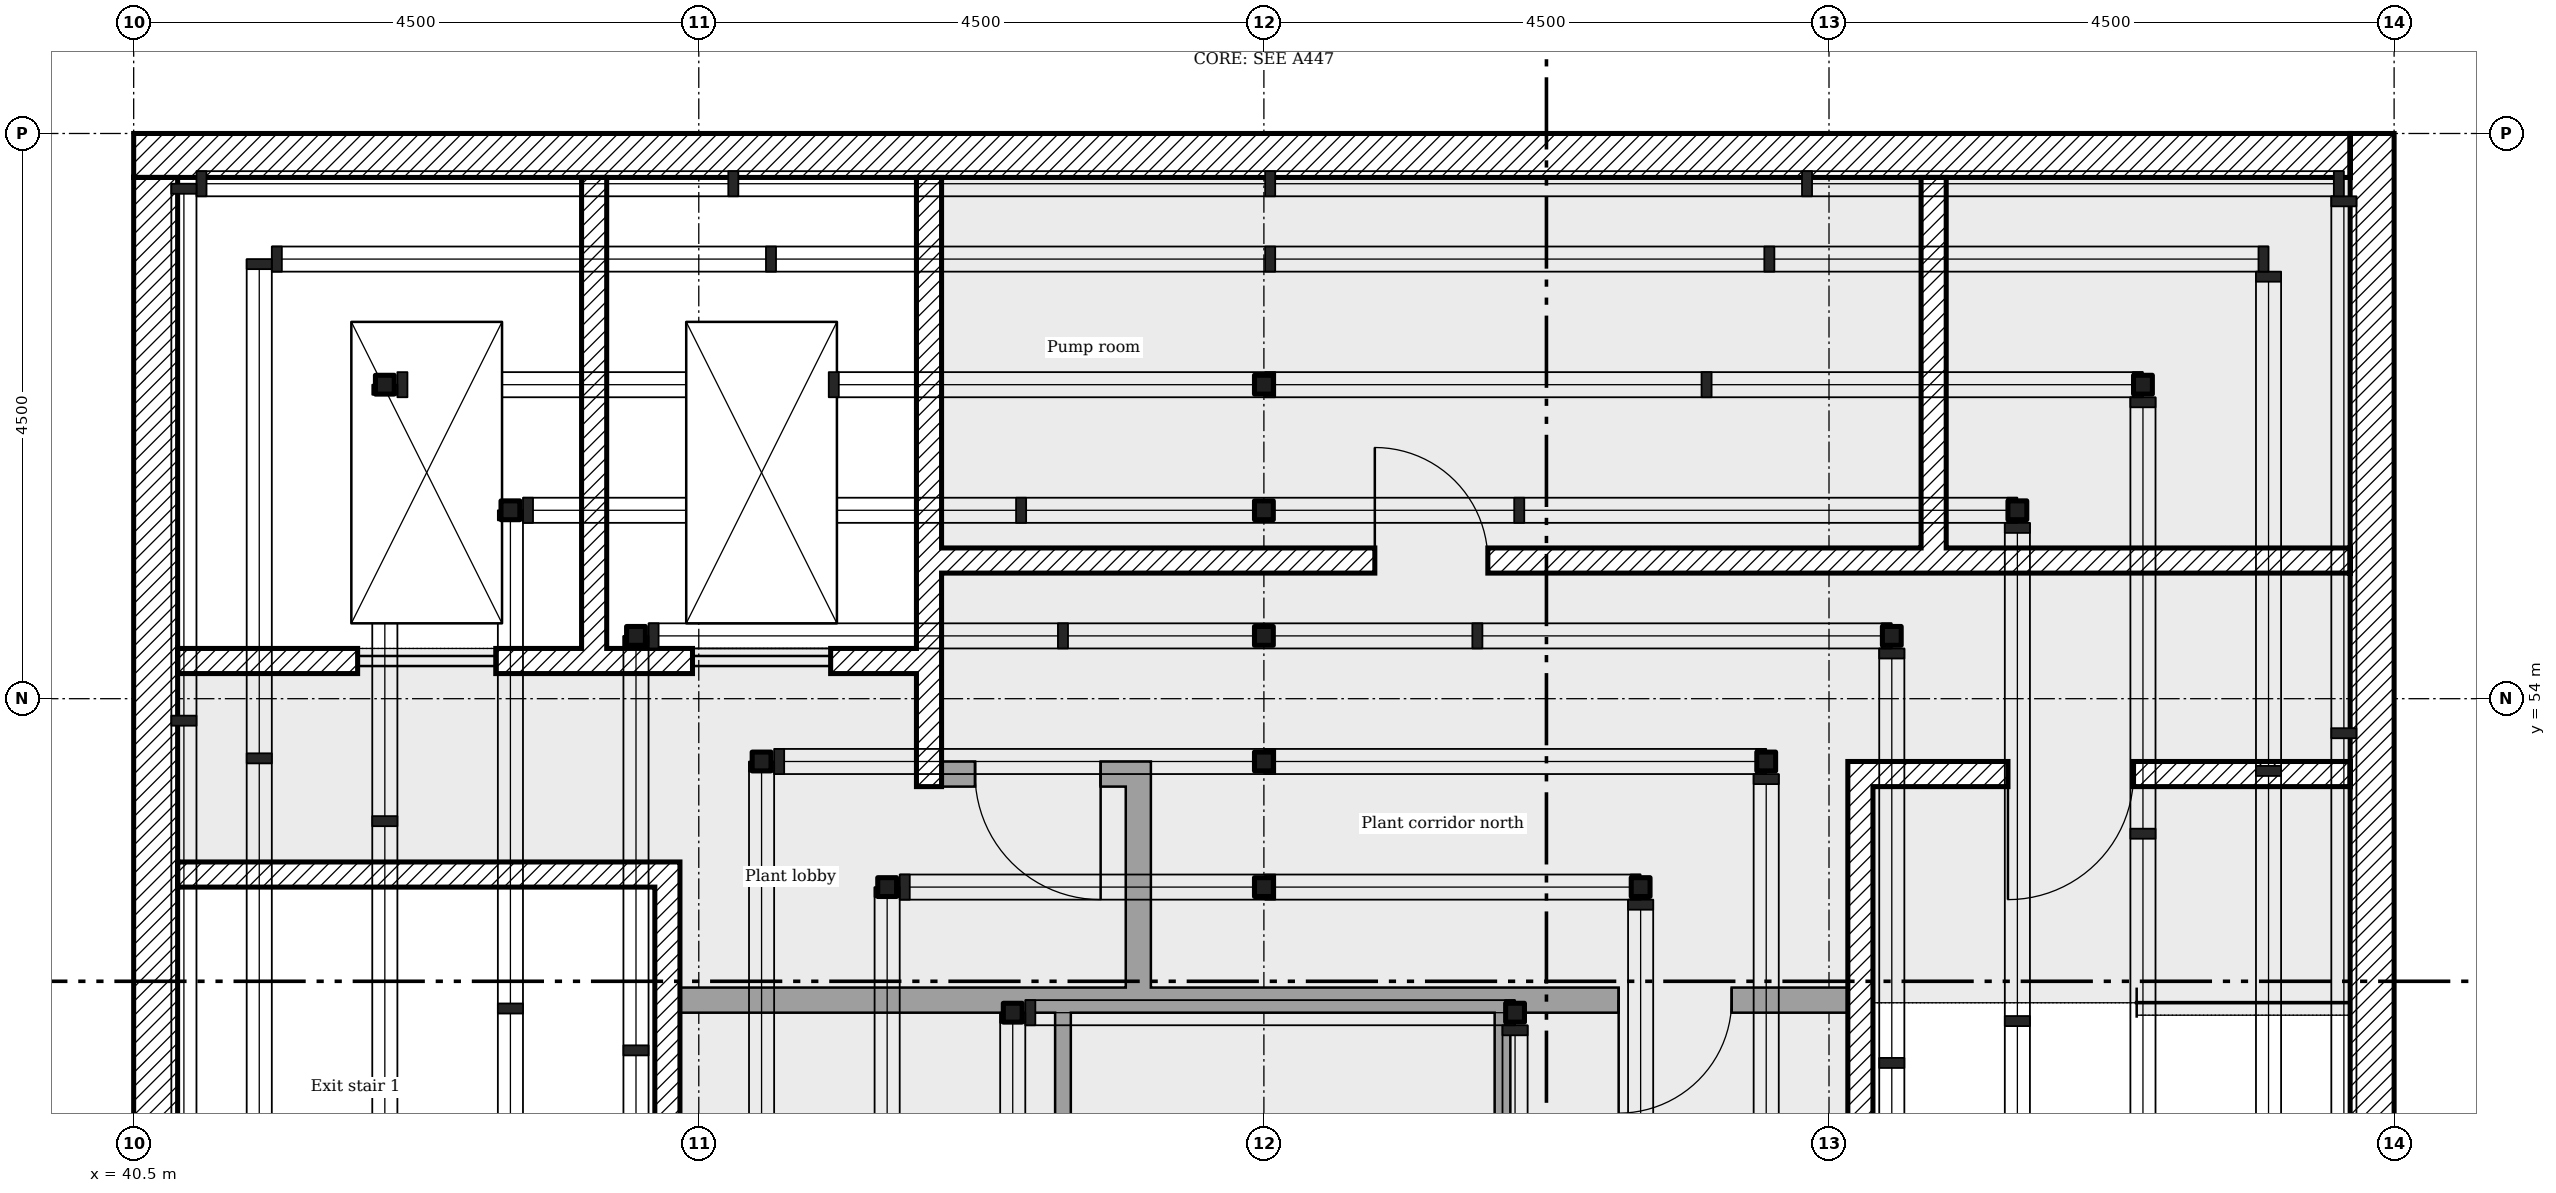
"""IFC4 building model, lengths in metres.
Left out: names, types, materials, properties, quantities, classifications, styles, units other than length and angle.
Written with IfcOpenShell. Run it as: python <this file> out.ifc"""

import sys

from ifc_helpers import new_model, si_unit, direction, frame, frame_2d, origin, origin_2d, place, context, subcontext, project, spatial, rectangle, hollow_rectangle, extrude, element, fill, save


model = new_model("IFC4")
c1 = context("Model", 3, precision=1e-05, world=origin(), true_north=direction((0.0, 1.0)))
c2 = subcontext(c1, "Body", "Model", "MODEL_VIEW")
j1 = project(units=[si_unit("LENGTHUNIT", "METRE"), si_unit("PLANEANGLEUNIT", "RADIAN")], contexts=[c1])
p1 = place(None, origin())
s1 = spatial("IfcSite", under=j1, at=p1, CompositionType="ELEMENT")
p2 = place(p1, origin())
s2 = spatial("IfcBuilding", under=s1, at=p2, CompositionType="ELEMENT")
p3 = place(p2, frame((0.0, 0.0, 279.1)))
s3 = spatial("IfcBuildingStorey", under=s2, at=p3, CompositionType="ELEMENT", Elevation=279.1)
for number, where, z_axis, x_axis in (
    (1, (58.375, 40.75, 4.5), (0.0, 0.0, 1.0), (0.0, 1.0, 0.0)),
    (2, (58.25, 58.375, 4.5), (0.0, 0.0, 1.0), (-1.0, 0.0, 0.0)),
):
    element("IfcWall", number, at=place(p3, frame(where, z_axis=z_axis, x_axis=x_axis)), inside=s3, PredefinedType="PARAPET", context=c2, shape_type="SweptSolid", body=[
        extrude(rectangle(XDim=17.75, YDim=0.25, at=frame_2d((8.875, 0.0))), origin(), (0.0, 0.0, 1.0), 1.1),
    ])
p4 = place(p3, frame((40.625, 58.25, 4.5), z_axis=(0.0, 0.0, 1.0), x_axis=(0.0, -1.0, 0.0)))
e3 = element("IfcWall", 3, at=p4, inside=s3, PredefinedType="PARAPET", context=c2, shape_type="SweptSolid", body=[
    extrude(rectangle(XDim=17.5, YDim=0.25, at=frame_2d((8.75, 0.0))), origin(), (0.0, 0.0, 1.0), 1.1),
])
for number, where in (
    (4, (56.5, 56.5, 4.5)),
    (5, (49.5, 56.5, 4.5)),
    (6, (42.5, 56.5, 4.5)),
):
    element("IfcColumn", number, at=place(p3, frame(where)), inside=s3, PredefinedType="COLUMN", context=c2, shape_type="SweptSolid", body=[
        extrude(hollow_rectangle(XDim=0.15, YDim=0.15, WallThickness=0.008, at=origin_2d()), origin(), (0.0, 0.0, 1.0), 1.8),
    ])
for number, where in (
    (7, (55.5, 55.5, 4.5)),
    (8, (49.5, 55.5, 4.5)),
    (9, (43.5, 55.5, 4.5)),
):
    element("IfcColumn", number, at=place(p3, frame(where)), inside=s3, PredefinedType="COLUMN", context=c2, shape_type="SweptSolid", body=[
        extrude(hollow_rectangle(XDim=0.15, YDim=0.15, WallThickness=0.008, at=origin_2d()), origin(), (0.0, 0.0, 1.0), 3.95),
    ])
for number, where in (
    (10, (54.5, 54.5, 4.5)),
    (11, (49.5, 54.5, 4.5)),
    (12, (44.5, 54.5, 4.5)),
):
    element("IfcColumn", number, at=place(p3, frame(where)), inside=s3, PredefinedType="COLUMN", context=c2, shape_type="SweptSolid", body=[
        extrude(hollow_rectangle(XDim=0.15, YDim=0.15, WallThickness=0.008, at=origin_2d()), origin(), (0.0, 0.0, 1.0), 6.1),
    ])
for number, where in (
    (13, (53.5, 53.5, 4.5)),
    (14, (49.5, 53.5, 4.5)),
    (15, (45.5, 53.5, 4.5)),
):
    element("IfcColumn", number, at=place(p3, frame(where)), inside=s3, PredefinedType="COLUMN", context=c2, shape_type="SweptSolid", body=[
        extrude(hollow_rectangle(XDim=0.15, YDim=0.15, WallThickness=0.008, at=origin_2d()), origin(), (0.0, 0.0, 1.0), 8.29),
    ])
for number, where in (
    (16, (52.5, 52.5, 4.5)),
    (17, (49.5, 52.5, 4.5)),
    (18, (46.5, 52.5, 4.5)),
):
    element("IfcColumn", number, at=place(p3, frame(where)), inside=s3, PredefinedType="COLUMN", context=c2, shape_type="SweptSolid", body=[
        extrude(hollow_rectangle(XDim=0.15, YDim=0.15, WallThickness=0.008, at=origin_2d()), origin(), (0.0, 0.0, 1.0), 10.48),
    ])
for number, where in (
    (19, (51.5, 51.5, 4.5)),
    (20, (47.5, 51.5, 4.5)),
):
    element("IfcColumn", number, at=place(p3, frame(where)), inside=s3, PredefinedType="COLUMN", context=c2, shape_type="SweptSolid", body=[
        extrude(hollow_rectangle(XDim=0.15, YDim=0.15, WallThickness=0.008, at=origin_2d()), origin(), (0.0, 0.0, 1.0), 12.59),
    ])
p5 = place(p3, frame((58.325, 40.5, 0.0), z_axis=(0.0, 0.0, 1.0), x_axis=(0.0, 1.0, 0.0)))
e21 = element("IfcWall", 21, at=p5, inside=s3, PredefinedType="SHEAR", context=c2, shape_type="SweptSolid", body=[
    extrude(rectangle(XDim=18.0, YDim=0.35, at=frame_2d((9.0, 0.0))), origin(), (0.0, 0.0, 1.0), 3.3),
])
p6 = place(p3, frame((40.5, 58.325, 0.0)))
e22 = element("IfcWall", 22, at=p6, inside=s3, PredefinedType="SHEAR", context=c2, shape_type="SweptSolid", body=[
    extrude(rectangle(XDim=17.65, YDim=0.35, at=frame_2d((8.825, 0.0))), origin(), (0.0, 0.0, 1.0), 3.3),
])
p7 = place(p3, frame((40.675, 40.85, 0.0), z_axis=(0.0, 0.0, 1.0), x_axis=(0.0, 1.0, 0.0)))
e23 = element("IfcWall", 23, at=p7, inside=s3, PredefinedType="SHEAR", context=c2, shape_type="SweptSolid", body=[
    extrude(rectangle(XDim=17.3, YDim=0.35, at=frame_2d((8.65, 0.0))), origin(), (0.0, 0.0, 1.0), 3.3),
])
p8 = place(p3, frame((44.167, 58.15, 0.0), z_axis=(0.0, 0.0, 1.0), x_axis=(0.0, -1.0, 0.0)))
e24 = element("IfcWall", 24, at=p8, inside=s3, PredefinedType="SHEAR", context=c2, shape_type="SweptSolid", body=[
    extrude(rectangle(XDim=3.75, YDim=0.2, at=frame_2d((1.875, 0.0))), origin(), (0.0, 0.0, 1.0), 3.3),
])
p9 = place(p3, frame((46.833, 58.15, 0.0), z_axis=(0.0, 0.0, 1.0), x_axis=(0.0, -1.0, 0.0)))
e25 = element("IfcWall", 25, at=p9, inside=s3, PredefinedType="SHEAR", context=c2, shape_type="SweptSolid", body=[
    extrude(rectangle(XDim=4.85, YDim=0.2, at=frame_2d((2.425, 0.0))), origin(), (0.0, 0.0, 1.0), 3.3),
])
p10 = place(p3, frame((54.833, 58.15, 0.0), z_axis=(0.0, 0.0, 1.0), x_axis=(0.0, -1.0, 0.0)))
e26 = element("IfcWall", 26, at=p10, inside=s3, PredefinedType="SHEAR", context=c2, shape_type="SweptSolid", body=[
    extrude(rectangle(XDim=2.95, YDim=0.2, at=frame_2d((1.475, 0.0))), origin(), (0.0, 0.0, 1.0), 3.3),
])
p11 = place(p3, frame((48.5, 51.6, 0.0), z_axis=(0.0, 0.0, 1.0), x_axis=(0.0, 1.0, 0.0)))
e27 = element("IfcWall", 27, at=p11, inside=s3, PredefinedType="PARTITIONING", context=c2, shape_type="SweptSolid", body=[
    extrude(rectangle(XDim=1.9, YDim=0.2, at=frame_2d((0.95, 0.0))), origin(), (0.0, 0.0, 1.0), 3.3),
])
p12 = place(p3, frame((46.933, 53.4, 0.0)))
e28 = element("IfcWall", 28, at=p12, inside=s3, PredefinedType="PARTITIONING", context=c2, shape_type="SweptSolid", body=[
    extrude(rectangle(XDim=1.467, YDim=0.2, at=frame_2d((0.733, 0.0))), origin(), (0.0, 0.0, 1.0), 3.3),
])
p13 = place(p12, frame((0.267, 0.0, 0.0)))
e29 = element("IfcOpeningElement", 29, at=p13, cuts=e28, PredefinedType="OPENING", context=c2, shape_type="SweptSolid", body=[
    extrude(rectangle(XDim=1.0, YDim=2.1, at=frame_2d((0.5, 1.05))), frame((0.0, 0.11, 0.0), z_axis=(0.0, -1.0, 0.0), x_axis=(1.0, 0.0, 0.0)), (0.0, 0.0, 1.0), 0.22),
])
p14 = place(p3, frame((46.933, 55.1, 0.0)))
e30 = element("IfcWall", 30, at=p14, inside=s3, PredefinedType="SHEAR", context=c2, shape_type="SweptSolid", body=[
    extrude(rectangle(XDim=11.217, YDim=0.2, at=frame_2d((5.608, 0.0))), origin(), (0.0, 0.0, 1.0), 3.3),
])
p15 = place(p14, frame((3.45, 0.0, 0.0)))
e31 = element("IfcOpeningElement", 31, at=p15, cuts=e30, PredefinedType="OPENING", context=c2, shape_type="SweptSolid", body=[
    extrude(rectangle(XDim=0.9, YDim=2.1, at=frame_2d((0.45, 1.05))), frame((0.0, 0.11, 0.0), z_axis=(0.0, -1.0, 0.0), x_axis=(1.0, 0.0, 0.0)), (0.0, 0.0, 1.0), 0.22),
])
p16 = place(p3, frame((40.85, 54.3, 0.0)))
e32 = element("IfcWall", 32, at=p16, inside=s3, PredefinedType="SHEAR", context=c2, shape_type="SweptSolid", body=[
    extrude(rectangle(XDim=5.883, YDim=0.2, at=frame_2d((2.942, 0.0))), origin(), (0.0, 0.0, 1.0), 3.3),
])
p17 = place(p16, frame((1.433, 0.0, 0.0)))
e33 = element("IfcOpeningElement", 33, at=p17, cuts=e32, PredefinedType="OPENING", context=c2, shape_type="SweptSolid", body=[
    extrude(rectangle(XDim=1.1, YDim=2.1, at=frame_2d((0.55, 1.05))), frame((0.0, 0.11, 0.0), z_axis=(0.0, -1.0, 0.0), x_axis=(1.0, 0.0, 0.0)), (0.0, 0.0, 1.0), 0.22),
])
p18 = place(p16, frame((4.1, 0.0, 0.0)))
e34 = element("IfcOpeningElement", 34, at=p18, cuts=e32, PredefinedType="OPENING", context=c2, shape_type="SweptSolid", body=[
    extrude(rectangle(XDim=1.1, YDim=2.1, at=frame_2d((0.55, 1.05))), frame((0.0, 0.11, 0.0), z_axis=(0.0, -1.0, 0.0), x_axis=(1.0, 0.0, 0.0)), (0.0, 0.0, 1.0), 0.22),
])
p19 = place(p3, frame((44.75, 45.5, 0.0), z_axis=(0.0, 0.0, 1.0), x_axis=(0.0, 1.0, 0.0)))
e35 = element("IfcWall", 35, at=p19, inside=s3, PredefinedType="SHEAR", context=c2, shape_type="SweptSolid", body=[
    extrude(rectangle(XDim=7.2, YDim=0.2, at=frame_2d((3.6, 0.0))), origin(), (0.0, 0.0, 1.0), 3.3),
])
p20 = place(p3, frame((40.85, 52.6, 0.0)))
e36 = element("IfcWall", 36, at=p20, inside=s3, PredefinedType="SHEAR", context=c2, shape_type="SweptSolid", body=[
    extrude(rectangle(XDim=3.8, YDim=0.2, at=frame_2d((1.9, 0.0))), origin(), (0.0, 0.0, 1.0), 3.3),
])
p21 = place(p3, frame((54.15, 53.4, 0.0)))
e37 = element("IfcWall", 37, at=p21, inside=s3, PredefinedType="SHEAR", context=c2, shape_type="SweptSolid", body=[
    extrude(rectangle(XDim=4.0, YDim=0.2, at=frame_2d((2.0, 0.0))), origin(), (0.0, 0.0, 1.0), 3.3),
])
p22 = place(p21, frame((1.275, 0.0, 0.0)))
e38 = element("IfcOpeningElement", 38, at=p22, cuts=e37, PredefinedType="OPENING", context=c2, shape_type="SweptSolid", body=[
    extrude(rectangle(XDim=1.0, YDim=2.1, at=frame_2d((0.5, 1.05))), frame((0.0, 0.11, 0.0), z_axis=(0.0, -1.0, 0.0), x_axis=(1.0, 0.0, 0.0)), (0.0, 0.0, 1.0), 0.22),
])
p23 = place(p3, frame((54.25, 46.5, 0.0), z_axis=(0.0, 0.0, 1.0), x_axis=(0.0, 1.0, 0.0)))
e39 = element("IfcWall", 39, at=p23, inside=s3, PredefinedType="SHEAR", context=c2, shape_type="SweptSolid", body=[
    extrude(rectangle(XDim=6.8, YDim=0.2, at=frame_2d((3.4, 0.0))), origin(), (0.0, 0.0, 1.0), 3.3),
])
p24 = place(p3, frame((44.85, 51.6, 0.0)))
e40 = element("IfcWall", 40, at=p24, inside=s3, PredefinedType="PARTITIONING", context=c2, shape_type="SweptSolid", body=[
    extrude(rectangle(XDim=9.3, YDim=0.2, at=frame_2d((4.65, 0.0))), origin(), (0.0, 0.0, 1.0), 3.3),
])
p25 = place(p24, frame((7.475, 0.0, 0.0)))
e41 = element("IfcOpeningElement", 41, at=p25, cuts=e40, PredefinedType="OPENING", context=c2, shape_type="SweptSolid", body=[
    extrude(rectangle(XDim=0.9, YDim=2.1, at=frame_2d((0.45, 1.05))), frame((0.0, 0.11, 0.0), z_axis=(0.0, -1.0, 0.0), x_axis=(1.0, 0.0, 0.0)), (0.0, 0.0, 1.0), 0.22),
])
p26 = place(p3, frame((47.9, 46.8, 0.0), z_axis=(0.0, 0.0, 1.0), x_axis=(0.0, 1.0, 0.0)))
e42 = element("IfcWall", 42, at=p26, inside=s3, PredefinedType="PARTITIONING", context=c2, shape_type="SweptSolid", body=[
    extrude(rectangle(XDim=4.7, YDim=0.125, at=frame_2d((2.35, 0.0))), origin(), (0.0, 0.0, 1.0), 3.3),
])
p27 = place(p3, frame((51.4, 49.5, 0.0), z_axis=(0.0, 0.0, 1.0), x_axis=(0.0, 1.0, 0.0)))
e43 = element("IfcWall", 43, at=p27, inside=s3, PredefinedType="PARTITIONING", context=c2, shape_type="SweptSolid", body=[
    extrude(rectangle(XDim=2.0, YDim=0.125, at=frame_2d((1.0, 0.0))), origin(), (0.0, 0.0, 1.0), 3.3),
])
p28 = place(p22, frame((1.0, 0.0, 0.0), x_axis=(-1.0, 0.0, 0.0)))
e44 = element("IfcDoor", 44, at=p28, inside=s3, OperationType="SINGLE_SWING_LEFT", PredefinedType="DOOR", context=c2, shape_type="SweptSolid", body=[
    extrude(rectangle(XDim=1.0, YDim=2.1, at=frame_2d((0.5, 1.05))), frame((0.0, 0.025, 0.0), z_axis=(0.0, -1.0, 0.0), x_axis=(1.0, 0.0, 0.0)), (0.0, 0.0, 1.0), 0.05),
])
fill(e38, e44)
p29 = place(p13, frame((1.0, 0.0, 0.0), x_axis=(-1.0, 0.0, 0.0)))
e45 = element("IfcDoor", 45, at=p29, inside=s3, OperationType="SINGLE_SWING_RIGHT", PredefinedType="DOOR", context=c2, shape_type="SweptSolid", body=[
    extrude(rectangle(XDim=1.0, YDim=2.1, at=frame_2d((0.5, 1.05))), frame((0.0, 0.025, 0.0), z_axis=(0.0, -1.0, 0.0), x_axis=(1.0, 0.0, 0.0)), (0.0, 0.0, 1.0), 0.05),
])
fill(e29, e45)
p30 = place(p15, origin())
e46 = element("IfcDoor", 46, at=p30, inside=s3, OperationType="SINGLE_SWING_RIGHT", PredefinedType="DOOR", context=c2, shape_type="SweptSolid", body=[
    extrude(rectangle(XDim=0.9, YDim=2.1, at=frame_2d((0.45, 1.05))), frame((0.0, 0.025, 0.0), z_axis=(0.0, -1.0, 0.0), x_axis=(1.0, 0.0, 0.0)), (0.0, 0.0, 1.0), 0.05),
])
fill(e31, e46)
p31 = place(p25, frame((0.9, 0.0, 0.0), x_axis=(-1.0, 0.0, 0.0)))
e47 = element("IfcDoor", 47, at=p31, inside=s3, OperationType="SINGLE_SWING_LEFT", PredefinedType="DOOR", context=c2, shape_type="SweptSolid", body=[
    extrude(rectangle(XDim=0.9, YDim=2.1, at=frame_2d((0.45, 1.05))), frame((0.0, 0.025, 0.0), z_axis=(0.0, -1.0, 0.0), x_axis=(1.0, 0.0, 0.0)), (0.0, 0.0, 1.0), 0.05),
])
fill(e41, e47)
p32 = place(p17, origin())
e48 = element("IfcDoor", 48, at=p32, inside=s3, OperationType="SLIDING_TO_LEFT", PredefinedType="DOOR", context=c2, shape_type="SweptSolid", body=[
    extrude(rectangle(XDim=1.1, YDim=2.1, at=frame_2d((0.55, 1.05))), frame((0.0, 0.025, 0.0), z_axis=(0.0, -1.0, 0.0), x_axis=(1.0, 0.0, 0.0)), (0.0, 0.0, 1.0), 0.05),
])
fill(e33, e48)
p33 = place(p18, origin())
e49 = element("IfcDoor", 49, at=p33, inside=s3, OperationType="SLIDING_TO_LEFT", PredefinedType="DOOR", context=c2, shape_type="SweptSolid", body=[
    extrude(rectangle(XDim=1.1, YDim=2.1, at=frame_2d((0.55, 1.05))), frame((0.0, 0.025, 0.0), z_axis=(0.0, -1.0, 0.0), x_axis=(1.0, 0.0, 0.0)), (0.0, 0.0, 1.0), 0.05),
])
fill(e34, e49)
save(model, sys.argv[1])
